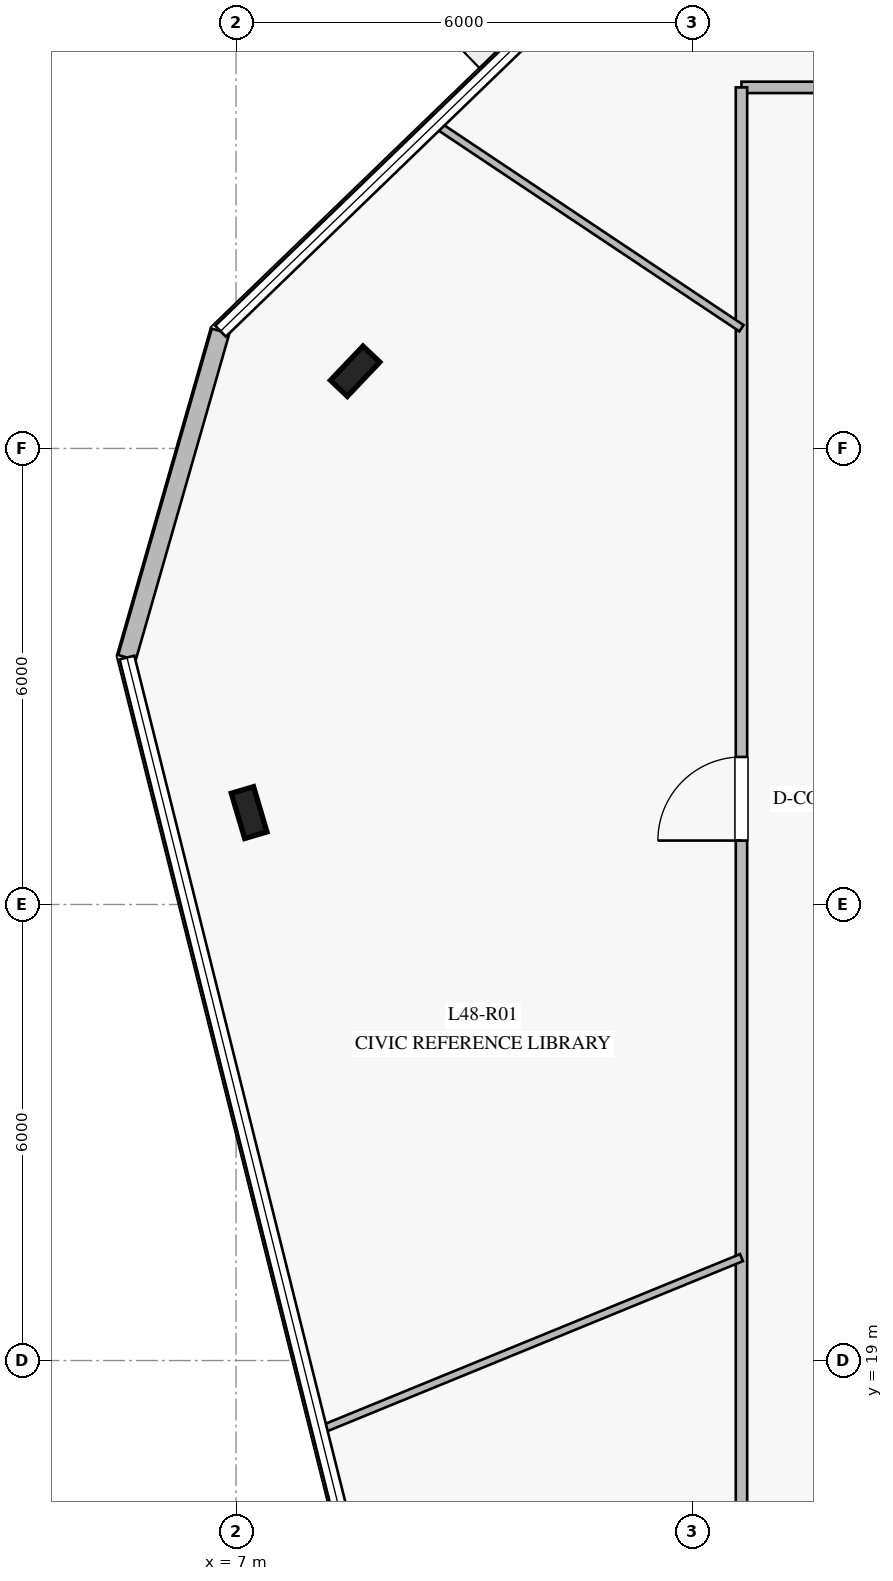
"""IFC4 building model, lengths in metres.
Left out: names, types, materials, properties, quantities, classifications, styles, units other than length and angle.
Written with IfcOpenShell. Run it as: python <this file> out.ifc"""

import sys

from ifc_helpers import new_model, si_unit, direction, frame, frame_2d, origin, origin_2d, place, context, subcontext, project, spatial, rectangle, i_section, extrude, element, fill, save


model = new_model("IFC4")
c1 = context("Model", 3, precision=1e-05, world=origin(), true_north=direction((0.0, 1.0)))
c2 = subcontext(c1, "Body", "Model", "MODEL_VIEW")
j1 = project(units=[si_unit("LENGTHUNIT", "METRE"), si_unit("PLANEANGLEUNIT", "RADIAN")], contexts=[c1])
p1 = place(None, origin())
s1 = spatial("IfcSite", under=j1, at=p1, CompositionType="ELEMENT")
p2 = place(p1, origin())
s2 = spatial("IfcBuilding", under=s1, at=p2, CompositionType="ELEMENT")
p3 = place(p2, frame((0.0, 0.0, 200.8)))
s3 = spatial("IfcBuildingStorey", under=s2, at=p3, CompositionType="ELEMENT", Elevation=200.8)
for number, where, z_axis, x_axis in (
    (1, (8.567, 32.016, 0.0), (0.0, 0.0, 1.0), (0.688, 0.725, 0.0)),
    (2, (7.172, 26.209, 0.0), (0.0, 0.0, 1.0), (-0.284, 0.959, 0.0)),
):
    element("IfcColumn", number, at=place(p3, frame(where, z_axis=z_axis, x_axis=x_axis)), inside=s3, PredefinedType="COLUMN", context=c2, shape_type="SweptSolid", body=[
        extrude(i_section(OverallWidth=0.305, OverallDepth=0.62, WebThickness=0.021, FlangeThickness=0.04, at=origin_2d()), origin(), (0.0, 0.0, 1.0), 4.0),
    ])
p4 = place(p3, frame((6.796, 32.543, 0.0), z_axis=(0.0, 0.0, 1.0), x_axis=(-0.275572820258, -0.961280198868, 0.0)))
e3 = element("IfcWall", 3, at=p4, inside=s3, PredefinedType="STANDARD", context=c2, shape_type="SweptSolid", body=[
    extrude(rectangle(XDim=4.467, YDim=0.24, at=frame_2d((2.233, 0.0))), origin(), (0.0, 0.0, 1.0), 3.78),
])
p5 = place(p3, frame((13.65, 35.75, 0.0), z_axis=(0.0, 0.0, 1.0), x_axis=(1.0, 0.0, 0.0)))
e4 = element("IfcWall", 4, at=p5, inside=s3, PredefinedType="PARTITIONING", context=c2, shape_type="SweptSolid", body=[
    extrude(rectangle(XDim=22.7, YDim=0.15, at=frame_2d((11.35, 0.0))), origin(), (0.0, 0.0, 1.0), 3.28),
])
p6 = place(p5, frame((21.099, 0.0, 0.0)))
e5 = element("IfcOpeningElement", 5, at=p6, cuts=e4, PredefinedType="OPENING", context=c2, shape_type="SweptSolid", body=[
    extrude(rectangle(XDim=1.1, YDim=2.2, at=frame_2d((0.55, 1.1))), frame((0.0, 0.085, 0.0), z_axis=(0.0, -1.0, 0.0), x_axis=(1.0, 0.0, 0.0)), (0.0, 0.0, 1.0), 0.17),
])
p7 = place(p5, frame((14.554, 0.0, 0.0)))
e6 = element("IfcOpeningElement", 6, at=p7, cuts=e4, PredefinedType="OPENING", context=c2, shape_type="SweptSolid", body=[
    extrude(rectangle(XDim=1.1, YDim=2.2, at=frame_2d((0.55, 1.1))), frame((0.0, 0.085, 0.0), z_axis=(0.0, -1.0, 0.0), x_axis=(1.0, 0.0, 0.0)), (0.0, 0.0, 1.0), 0.17),
])
p8 = place(p5, frame((4.597, 0.0, 0.0)))
e7 = element("IfcOpeningElement", 7, at=p8, cuts=e4, PredefinedType="OPENING", context=c2, shape_type="SweptSolid", body=[
    extrude(rectangle(XDim=1.1, YDim=2.2, at=frame_2d((0.55, 1.1))), frame((0.0, 0.085, 0.0), z_axis=(0.0, -1.0, 0.0), x_axis=(1.0, 0.0, 0.0)), (0.0, 0.0, 1.0), 0.17),
])
p9 = place(p3, frame((13.65, 14.25, 0.0), z_axis=(0.0, 0.0, 1.0), x_axis=(0.0, 1.0, 0.0)))
e8 = element("IfcWall", 8, at=p9, inside=s3, PredefinedType="PARTITIONING", context=c2, shape_type="SweptSolid", body=[
    extrude(rectangle(XDim=21.5, YDim=0.15, at=frame_2d((10.75, 0.0))), origin(), (0.0, 0.0, 1.0), 3.05),
])
p10 = place(p9, frame((11.591, 0.0, 0.0)))
e9 = element("IfcOpeningElement", 9, at=p10, cuts=e8, PredefinedType="OPENING", context=c2, shape_type="SweptSolid", body=[
    extrude(rectangle(XDim=1.1, YDim=2.2, at=frame_2d((0.55, 1.1))), frame((0.0, 0.085, 0.0), z_axis=(0.0, -1.0, 0.0), x_axis=(1.0, 0.0, 0.0)), (0.0, 0.0, 1.0), 0.17),
])
p11 = place(p3, frame((13.65, 32.581, 0.0), z_axis=(0.0, 0.0, 1.0), x_axis=(-0.831637717468, 0.555318563425, 0.0)))
e10 = element("IfcWall", 10, at=p11, inside=s3, PredefinedType="MOVABLE", context=c2, shape_type="SweptSolid", body=[
    extrude(rectangle(XDim=4.828, YDim=0.1, at=frame_2d((2.414, 0.0))), origin(), (0.0, 0.0, 1.0), 3.18),
])
p12 = place(p3, frame((13.65, 20.354, 0.0), z_axis=(0.0, 0.0, 1.0), x_axis=(-0.925511186293, -0.378720271503, 0.0)))
e11 = element("IfcWall", 11, at=p12, inside=s3, PredefinedType="MOVABLE", context=c2, shape_type="SweptSolid", body=[
    extrude(rectangle(XDim=5.98, YDim=0.1, at=frame_2d((2.99, 0.0))), origin(), (0.0, 0.0, 1.0), 3.05),
])
p13 = place(p10, origin())
e12 = element("IfcDoor", 12, at=p13, inside=s3, OperationType="SINGLE_SWING_LEFT", PredefinedType="DOOR", context=c2, shape_type="SweptSolid", body=[
    extrude(rectangle(XDim=1.1, YDim=2.2, at=frame_2d((0.55, 1.1))), frame((0.0, 0.025, 0.0), z_axis=(0.0, -1.0, 0.0), x_axis=(1.0, 0.0, 0.0)), (0.0, 0.0, 1.0), 0.05),
])
fill(e9, e12)
save(model, sys.argv[1])
